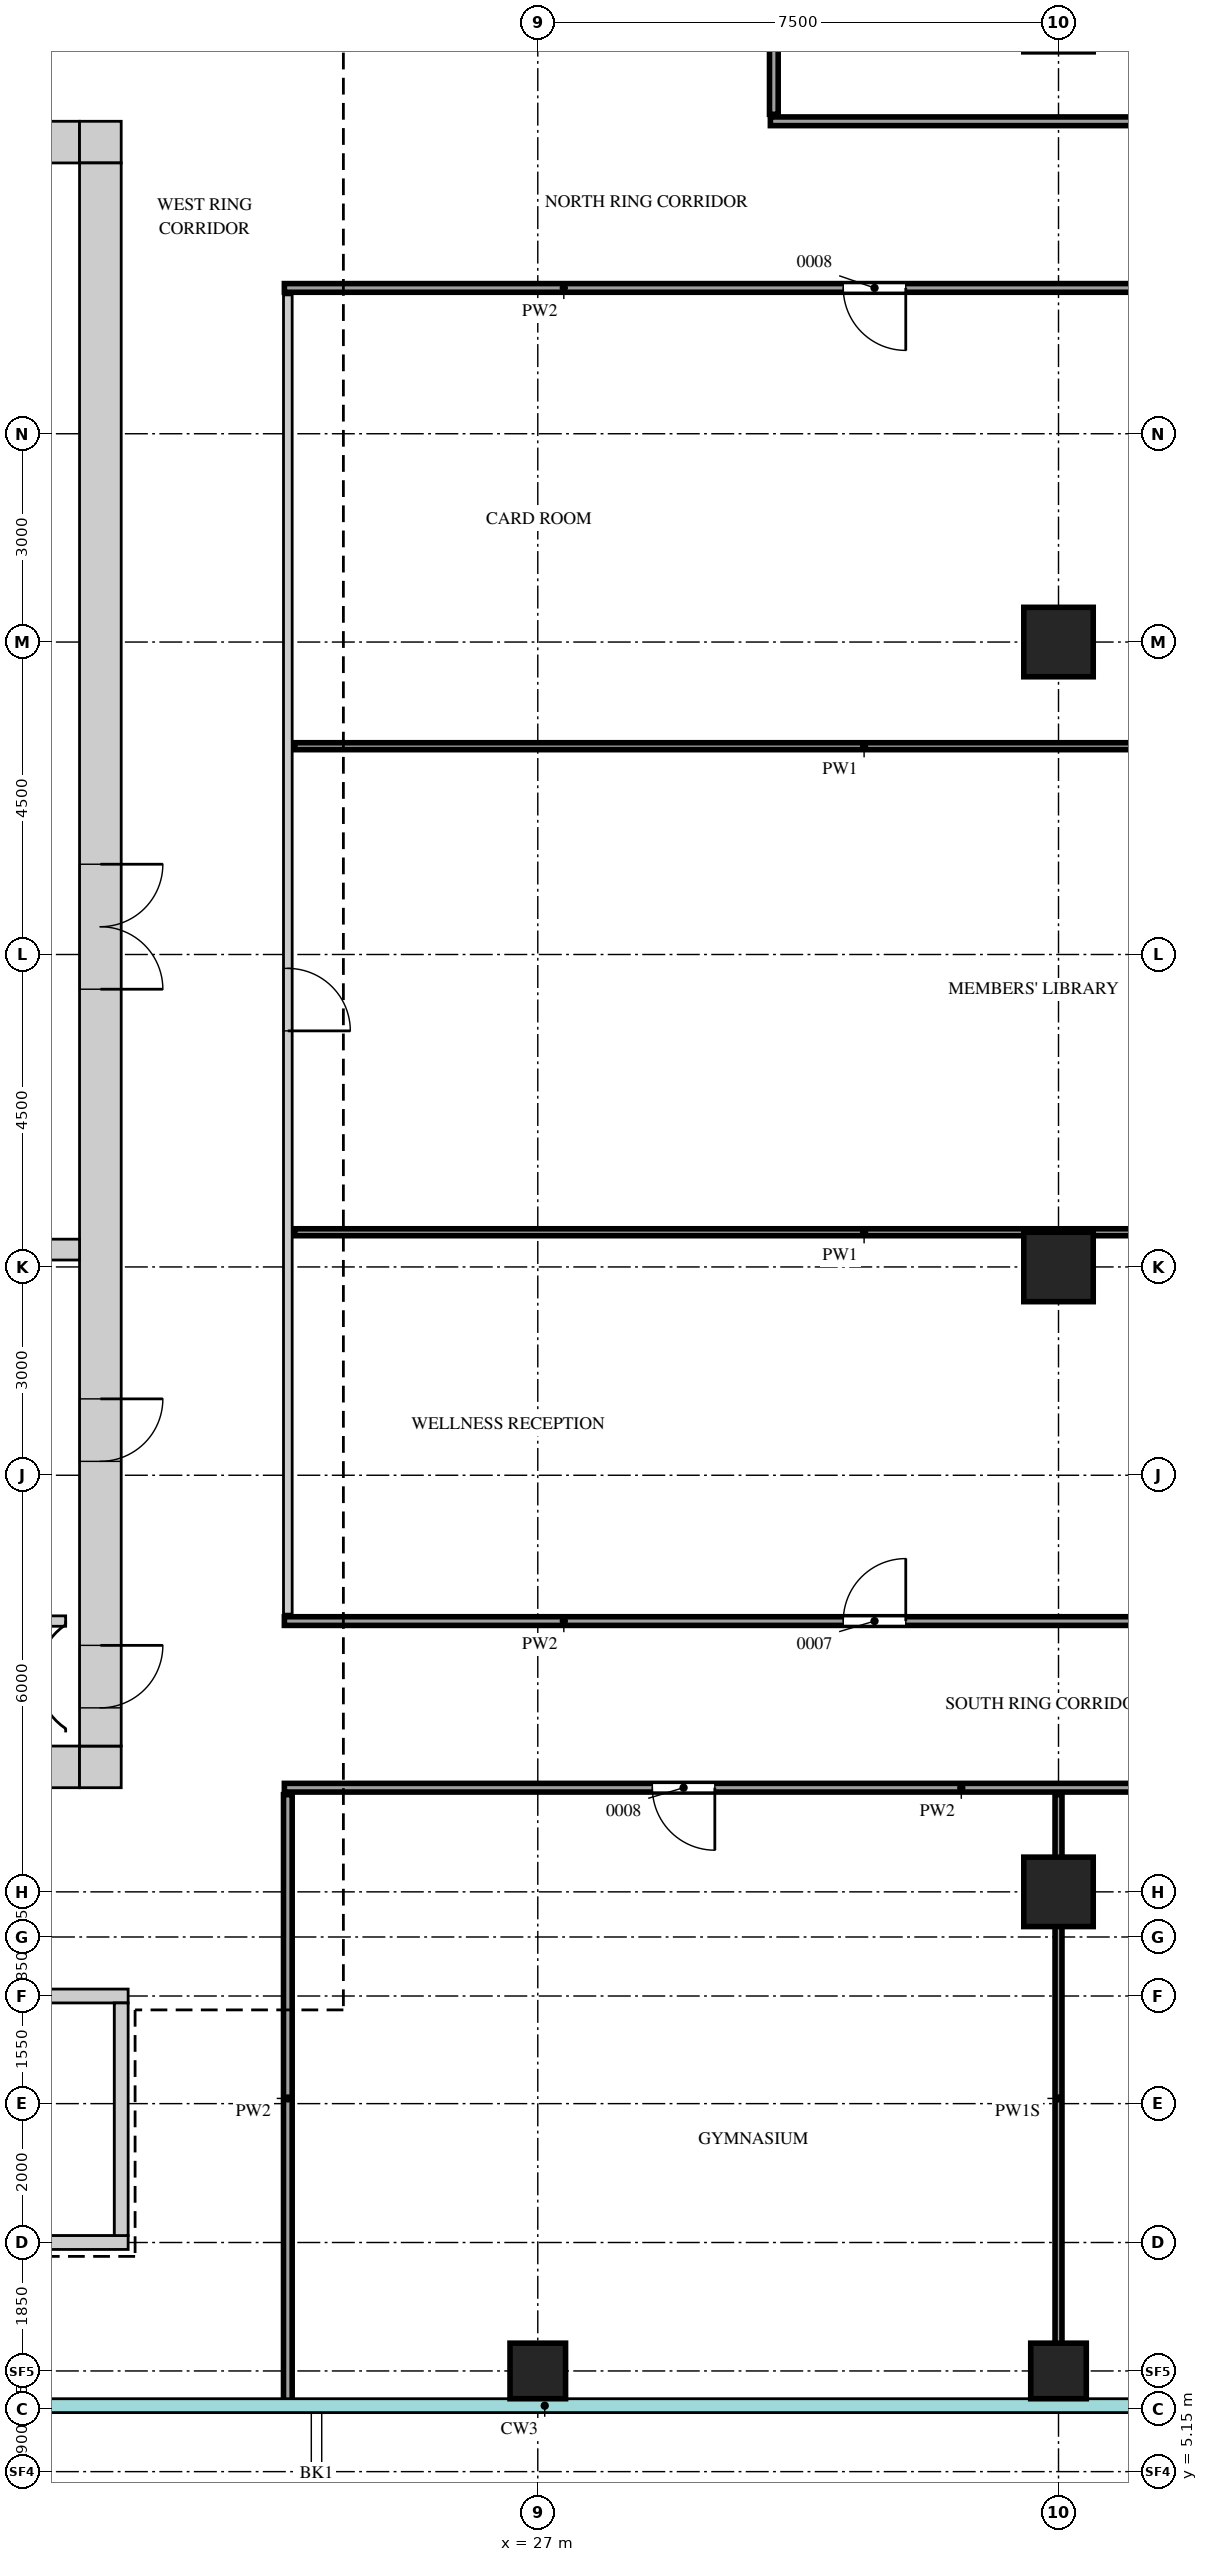
"""IFC4 building model, lengths in metres.
Left out: names, types, materials, properties, quantities, classifications, styles, units other than length and angle.
Written with IfcOpenShell. Run it as: python <this file> out.ifc"""

import sys

from ifc_helpers import new_model, si_unit, direction, frame, frame_2d, origin, origin_2d, place, context, subcontext, project, spatial, rectangle, extrude, source, transform, mapped, element, fill, save


model = new_model("IFC4")
c1 = context("Model", 3, precision=1e-05, world=origin(), true_north=direction((0.0, 1.0)))
c2 = subcontext(c1, "Body", "Model", "MODEL_VIEW")
j1 = project(units=[si_unit("LENGTHUNIT", "METRE"), si_unit("PLANEANGLEUNIT", "RADIAN")], contexts=[c1])
p1 = place(None, origin())
s1 = spatial("IfcSite", under=j1, at=p1, CompositionType="ELEMENT")
p2 = place(p1, origin())
s2 = spatial("IfcBuilding", under=s1, at=p2, CompositionType="ELEMENT")
p3 = place(p2, frame((0.0, 0.0, 298.2)))
s3 = spatial("IfcBuildingStorey", under=s2, at=p3, CompositionType="ELEMENT", Elevation=298.2)
m1 = source(origin(), c2, "Body", "SweptSolid", [
    extrude(rectangle(XDim=14.4, YDim=0.6, at=frame_2d((7.2, 0.0))), origin(), (0.0, 0.0, 1.0), 3.75),
])
p4 = place(p3, frame((6.0, 38.7, 0.0), z_axis=(0.0, 0.0, 1.0), x_axis=(1.0, 0.0, 0.0)))
e1 = element("IfcWall", 1, at=p4, inside=s3, PredefinedType="SHEAR", context=c2, shape_type="MappedRepresentation", body=[
    mapped(m1, transform((0.0, 0.0, 0.0))),
])
m2 = source(origin(), c2, "Body", "SweptSolid", [
    extrude(rectangle(XDim=0.9, YDim=2.1, at=frame_2d((0.45, 1.05))), frame((0.0, 0.31, 0.0), z_axis=(0.0, -1.0, 0.0), x_axis=(1.0, 0.0, 0.0)), (0.0, 0.0, 1.0), 0.62),
])
p5 = place(p4, frame((3.7, 0.0, 0.0)))
e2 = element("IfcOpeningElement", 2, at=p5, cuts=e1, PredefinedType="OPENING", context=c2, shape_type="MappedRepresentation", body=[
    mapped(m2, transform((0.0, 0.0, 0.0))),
])
p6 = place(p4, frame((8.7, 0.0, 0.0)))
e3 = element("IfcOpeningElement", 3, at=p6, cuts=e1, PredefinedType="OPENING", context=c2, shape_type="MappedRepresentation", body=[
    mapped(m2, transform((0.0, 0.0, 0.0))),
])
p7 = place(p4, frame((12.05, 0.0, 0.0)))
e4 = element("IfcOpeningElement", 4, at=p7, cuts=e1, PredefinedType="OPENING", context=c2, shape_type="MappedRepresentation", body=[
    mapped(m2, transform((0.0, 0.0, 0.0))),
])
m3 = source(origin(), c2, "Body", "SweptSolid", [
    extrude(rectangle(XDim=0.6, YDim=0.6, at=frame_2d((0.3, 0.0))), origin(), (0.0, 0.0, 1.0), 3.75),
])
p8 = place(p3, frame((20.4, 38.7, 0.0), z_axis=(0.0, 0.0, 1.0), x_axis=(1.0, 0.0, 0.0)))
e5 = element("IfcWall", 5, at=p8, inside=s3, PredefinedType="SHEAR", context=c2, shape_type="MappedRepresentation", body=[
    mapped(m3, transform((0.0, 0.0, 0.0))),
])
p9 = place(p3, frame((6.0, 15.3, 0.0), z_axis=(0.0, 0.0, 1.0), x_axis=(1.0, 0.0, 0.0)))
e6 = element("IfcWall", 6, at=p9, inside=s3, PredefinedType="SHEAR", context=c2, shape_type="MappedRepresentation", body=[
    mapped(m1, transform((0.0, 0.0, 0.0))),
])
m4 = source(origin(), c2, "Body", "SweptSolid", [
    extrude(rectangle(XDim=1.2, YDim=2.1, at=frame_2d((0.6, 1.05))), frame((0.0, 0.31, 0.0), z_axis=(0.0, -1.0, 0.0), x_axis=(1.0, 0.0, 0.0)), (0.0, 0.0, 1.0), 0.62),
])
p10 = place(p9, frame((6.2, 0.0, 0.0)))
e7 = element("IfcOpeningElement", 7, at=p10, cuts=e6, PredefinedType="OPENING", context=c2, shape_type="MappedRepresentation", body=[
    mapped(m4, transform((0.0, 0.0, 0.0))),
])
p11 = place(p9, frame((2.85, 0.0, 0.0)))
e8 = element("IfcOpeningElement", 8, at=p11, cuts=e6, PredefinedType="OPENING", context=c2, shape_type="MappedRepresentation", body=[
    mapped(m4, transform((0.0, 0.0, 0.0))),
])
m5 = source(origin(), c2, "Body", "SweptSolid", [
    extrude(rectangle(XDim=1.0, YDim=2.1, at=frame_2d((0.5, 1.05))), frame((0.0, 0.31, 0.0), z_axis=(0.0, -1.0, 0.0), x_axis=(1.0, 0.0, 0.0)), (0.0, 0.0, 1.0), 0.62),
])
p12 = place(p9, frame((8.7, 0.0, 0.0)))
e9 = element("IfcOpeningElement", 9, at=p12, cuts=e6, PredefinedType="OPENING", context=c2, shape_type="MappedRepresentation", body=[
    mapped(m5, transform((0.0, 0.0, 0.0))),
])
p13 = place(p3, frame((20.4, 15.3, 0.0), z_axis=(0.0, 0.0, 1.0), x_axis=(1.0, 0.0, 0.0)))
e10 = element("IfcWall", 10, at=p13, inside=s3, PredefinedType="SHEAR", context=c2, shape_type="MappedRepresentation", body=[
    mapped(m3, transform((0.0, 0.0, 0.0))),
])
m6 = source(origin(), c2, "Body", "SweptSolid", [
    extrude(rectangle(XDim=22.8, YDim=0.6, at=frame_2d((11.4, 0.0))), origin(), (0.0, 0.0, 1.0), 3.75),
])
p14 = place(p3, frame((20.7, 15.6, 0.0), z_axis=(0.0, 0.0, 1.0), x_axis=(0.0, 1.0, 0.0)))
e11 = element("IfcWall", 11, at=p14, inside=s3, PredefinedType="SHEAR", context=c2, shape_type="MappedRepresentation", body=[
    mapped(m6, transform((0.0, 0.0, 0.0))),
])
m7 = source(origin(), c2, "Body", "SweptSolid", [
    extrude(rectangle(XDim=1.8, YDim=2.1, at=frame_2d((0.9, 1.05))), frame((0.0, 0.31, 0.0), z_axis=(0.0, -1.0, 0.0), x_axis=(1.0, 0.0, 0.0)), (0.0, 0.0, 1.0), 0.62),
])
p15 = place(p14, frame((10.9, 0.0, 0.0)))
e12 = element("IfcOpeningElement", 12, at=p15, cuts=e11, PredefinedType="OPENING", context=c2, shape_type="MappedRepresentation", body=[
    mapped(m7, transform((0.0, 0.0, 0.0))),
])
p16 = place(p14, frame((0.55, 0.0, 0.0)))
e13 = element("IfcOpeningElement", 13, at=p16, cuts=e11, PredefinedType="OPENING", context=c2, shape_type="MappedRepresentation", body=[
    mapped(m2, transform((0.0, 0.0, 0.0))),
])
p17 = place(p14, frame((4.1, 0.0, 0.0)))
e14 = element("IfcOpeningElement", 14, at=p17, cuts=e11, PredefinedType="OPENING", context=c2, shape_type="MappedRepresentation", body=[
    mapped(m2, transform((0.0, 0.0, 0.0))),
])
m8 = source(origin(), c2, "Body", "SweptSolid", [
    extrude(rectangle(XDim=7.2, YDim=0.2, at=frame_2d((3.6, 0.0))), origin(), (0.0, 0.0, 1.0), 3.75),
])
p18 = place(p3, frame((13.9, 12.0, 0.0), z_axis=(0.0, 0.0, 1.0), x_axis=(1.0, 0.0, 0.0)))
e15 = element("IfcWall", 15, at=p18, inside=s3, PredefinedType="SHEAR", context=c2, shape_type="MappedRepresentation", body=[
    mapped(m8, transform((0.0, 0.0, 0.0))),
])
p19 = place(p3, frame((13.9, 8.45, 0.0), z_axis=(0.0, 0.0, 1.0), x_axis=(1.0, 0.0, 0.0)))
e16 = element("IfcWall", 16, at=p19, inside=s3, PredefinedType="SHEAR", context=c2, shape_type="MappedRepresentation", body=[
    mapped(m8, transform((0.0, 0.0, 0.0))),
])
m9 = source(origin(), c2, "Body", "SweptSolid", [
    extrude(rectangle(XDim=1.2, YDim=2.1, at=frame_2d((0.6, 1.05))), frame((0.0, 0.11, 0.0), z_axis=(0.0, -1.0, 0.0), x_axis=(1.0, 0.0, 0.0)), (0.0, 0.0, 1.0), 0.22),
])
p20 = place(p19, frame((0.35, 0.0, 0.0)))
e17 = element("IfcOpeningElement", 17, at=p20, cuts=e16, PredefinedType="OPENING", context=c2, shape_type="MappedRepresentation", body=[
    mapped(m9, transform((0.0, 0.0, 0.0))),
])
m10 = source(origin(), c2, "Body", "SweptSolid", [
    extrude(rectangle(XDim=3.35, YDim=0.2, at=frame_2d((1.675, 0.0))), origin(), (0.0, 0.0, 1.0), 3.75),
])
p21 = place(p3, frame((21.0, 8.55, 0.0), z_axis=(0.0, 0.0, 1.0), x_axis=(0.0, 1.0, 0.0)))
e18 = element("IfcWall", 18, at=p21, inside=s3, PredefinedType="SHEAR", context=c2, shape_type="MappedRepresentation", body=[
    mapped(m10, transform((0.0, 0.0, 0.0))),
])
m11 = source(origin(), c2, "Body", "SweptSolid", [
    extrude(rectangle(XDim=13.2, YDim=0.3, at=frame_2d((6.6, 0.0))), origin(), (0.0, 0.0, 1.0), 3.75),
])
p22 = place(p3, frame((7.2, 22.75, 0.0), z_axis=(0.0, 0.0, 1.0), x_axis=(1.0, 0.0, 0.0)))
e19 = element("IfcWall", 19, at=p22, inside=s3, PredefinedType="STANDARD", context=c2, shape_type="MappedRepresentation", body=[
    mapped(m11, transform((0.0, 0.0, 0.0))),
])
m12 = source(origin(), c2, "Body", "SweptSolid", [
    extrude(rectangle(XDim=0.8, YDim=0.8, at=origin_2d()), origin(), (0.0, 0.0, 1.0), 3.75),
])
for number, where, z_axis, x_axis in (
    (20, (27.0, 6.6, 0.0), (0.0, 0.0, 1.0), (1.0, 0.0, 0.0)),
    (21, (34.5, 6.6, 0.0), (0.0, 0.0, 1.0), (1.0, 0.0, 0.0)),
):
    element("IfcColumn", number, at=place(p3, frame(where, z_axis=z_axis, x_axis=x_axis)), inside=s3, PredefinedType="COLUMN", context=c2, shape_type="MappedRepresentation", body=[
        mapped(m12, transform((0.0, 0.0, 0.0))),
    ])
m13 = source(origin(), c2, "Body", "SweptSolid", [
    extrude(rectangle(XDim=1.0, YDim=1.0, at=origin_2d()), origin(), (0.0, 0.0, 1.0), 3.75),
])
for number, where, z_axis, x_axis in (
    (22, (34.5, 13.5, 0.0), (0.0, 0.0, 1.0), (1.0, 0.0, 0.0)),
    (23, (34.5, 22.5, 0.0), (0.0, 0.0, 1.0), (1.0, 0.0, 0.0)),
    (24, (34.5, 31.5, 0.0), (0.0, 0.0, 1.0), (1.0, 0.0, 0.0)),
):
    element("IfcColumn", number, at=place(p3, frame(where, z_axis=z_axis, x_axis=x_axis)), inside=s3, PredefinedType="COLUMN", context=c2, shape_type="MappedRepresentation", body=[
        mapped(m13, transform((0.0, 0.0, 0.0))),
    ])
m14 = source(origin(), c2, "Body", "SweptSolid", [
    extrude(rectangle(XDim=8.75, YDim=0.125, at=frame_2d((4.375, 0.0))), origin(), (0.0, 0.0, 1.0), 3.8),
])
p23 = place(p3, frame((23.4, 6.15, 0.0), z_axis=(0.0, 0.0, 1.0), x_axis=(0.0, 1.0, 0.0)))
e25 = element("IfcWall", 25, at=p23, inside=s3, PredefinedType="PARTITIONING", context=c2, shape_type="MappedRepresentation", body=[
    mapped(m14, transform((0.0, 0.0, 0.0))),
])
m15 = source(origin(), c2, "Body", "SweptSolid", [
    extrude(rectangle(XDim=8.75, YDim=0.1, at=frame_2d((4.375, 0.0))), origin(), (0.0, 0.0, 1.0), 3.35),
])
p24 = place(p3, frame((34.5, 6.15, 0.0), z_axis=(0.0, 0.0, 1.0), x_axis=(0.0, 1.0, 0.0)))
e26 = element("IfcWall", 26, at=p24, inside=s3, PredefinedType="PARTITIONING", context=c2, shape_type="MappedRepresentation", body=[
    mapped(m15, transform((0.0, 0.0, 0.0))),
])
m16 = source(origin(), c2, "Body", "SweptSolid", [
    extrude(rectangle(XDim=19.1, YDim=0.125, at=frame_2d((9.55, 0.0))), origin(), (0.0, 0.0, 1.0), 3.8),
])
p25 = place(p3, frame((23.35, 15.0, 0.0), z_axis=(0.0, 0.0, 1.0), x_axis=(1.0, 0.0, 0.0)))
e27 = element("IfcWall", 27, at=p25, inside=s3, PredefinedType="PARTITIONING", context=c2, shape_type="MappedRepresentation", body=[
    mapped(m16, transform((0.0, 0.0, 0.0))),
])
m17 = source(origin(), c2, "Body", "SweptSolid", [
    extrude(rectangle(XDim=0.9, YDim=2.1, at=frame_2d((0.45, 1.05))), frame((0.0, 0.073, 0.0), z_axis=(0.0, -1.0, 0.0), x_axis=(1.0, 0.0, 0.0)), (0.0, 0.0, 1.0), 0.145),
])
p26 = place(p25, frame((5.3, 0.0, 0.0)))
e28 = element("IfcOpeningElement", 28, at=p26, cuts=e27, PredefinedType="OPENING", context=c2, shape_type="MappedRepresentation", body=[
    mapped(m17, transform((0.0, 0.0, 0.0))),
])
p27 = place(p25, frame((13.3, 0.0, 0.0)))
e29 = element("IfcOpeningElement", 29, at=p27, cuts=e27, PredefinedType="OPENING", context=c2, shape_type="MappedRepresentation", body=[
    mapped(m17, transform((0.0, 0.0, 0.0))),
])
p28 = place(p25, frame((17.95, 0.0, 0.0)))
e30 = element("IfcOpeningElement", 30, at=p28, cuts=e27, PredefinedType="OPENING", context=c2, shape_type="MappedRepresentation", body=[
    mapped(m17, transform((0.0, 0.0, 0.0))),
])
m18 = source(origin(), c2, "Body", "SweptSolid", [
    extrude(rectangle(XDim=4.0, YDim=0.15, at=frame_2d((2.0, 0.0))), origin(), (0.0, 0.0, 1.0), 3.8),
])
p29 = place(p3, frame((16.2, 17.4, 0.0), z_axis=(0.0, 0.0, 1.0), x_axis=(1.0, 0.0, 0.0)))
e31 = element("IfcWall", 31, at=p29, inside=s3, PredefinedType="PARTITIONING", context=c2, shape_type="MappedRepresentation", body=[
    mapped(m18, transform((0.0, 0.0, 0.0))),
])
m19 = source(origin(), c2, "Body", "SweptSolid", [
    extrude(rectangle(XDim=16.7, YDim=0.125, at=frame_2d((8.35, 0.0))), origin(), (0.0, 0.0, 1.0), 3.8),
])
p30 = place(p3, frame((23.35, 17.4, 0.0), z_axis=(0.0, 0.0, 1.0), x_axis=(1.0, 0.0, 0.0)))
e32 = element("IfcWall", 32, at=p30, inside=s3, PredefinedType="PARTITIONING", context=c2, shape_type="MappedRepresentation", body=[
    mapped(m19, transform((0.0, 0.0, 0.0))),
])
p31 = place(p30, frame((8.05, 0.0, 0.0)))
e33 = element("IfcOpeningElement", 33, at=p31, cuts=e32, PredefinedType="OPENING", context=c2, shape_type="MappedRepresentation", body=[
    mapped(m17, transform((0.0, 0.0, 0.0))),
])
m20 = source(origin(), c2, "Body", "SweptSolid", [
    extrude(rectangle(XDim=19.0, YDim=0.125, at=frame_2d((9.5, 0.0))), origin(), (0.0, 0.0, 1.0), 3.8),
])
p32 = place(p3, frame((23.4, 17.5, 0.0), z_axis=(0.0, 0.0, 1.0), x_axis=(0.0, 1.0, 0.0)))
e34 = element("IfcWall", 34, at=p32, inside=s3, PredefinedType="PARTITIONING", context=c2, shape_type="MappedRepresentation", body=[
    mapped(m20, transform((0.0, 0.0, 0.0))),
])
p33 = place(p32, frame((8.4, 0.0, 0.0)))
e35 = element("IfcOpeningElement", 35, at=p33, cuts=e34, PredefinedType="OPENING", context=c2, shape_type="MappedRepresentation", body=[
    mapped(m17, transform((0.0, 0.0, 0.0))),
])
m21 = source(origin(), c2, "Body", "SweptSolid", [
    extrude(rectangle(XDim=16.4, YDim=0.1, at=frame_2d((8.2, 0.0))), origin(), (0.0, 0.0, 1.0), 3.8),
])
for number, where, z_axis, x_axis in (
    (36, (23.5, 23.0, 0.0), (0.0, 0.0, 1.0), (1.0, 0.0, 0.0)),
    (37, (23.5, 30.0, 0.0), (0.0, 0.0, 1.0), (1.0, 0.0, 0.0)),
):
    element("IfcWall", number, at=place(p3, frame(where, z_axis=z_axis, x_axis=x_axis)), inside=s3, PredefinedType="PARTITIONING", context=c2, shape_type="MappedRepresentation", body=[
        mapped(m21, transform((0.0, 0.0, 0.0))),
    ])
p34 = place(p3, frame((23.35, 36.6, 0.0), z_axis=(0.0, 0.0, 1.0), x_axis=(1.0, 0.0, 0.0)))
e38 = element("IfcWall", 38, at=p34, inside=s3, PredefinedType="PARTITIONING", context=c2, shape_type="MappedRepresentation", body=[
    mapped(m19, transform((0.0, 0.0, 0.0))),
])
p35 = place(p34, frame((8.05, 0.0, 0.0)))
e39 = element("IfcOpeningElement", 39, at=p35, cuts=e38, PredefinedType="OPENING", context=c2, shape_type="MappedRepresentation", body=[
    mapped(m17, transform((0.0, 0.0, 0.0))),
])
m22 = source(origin(), c2, "Body", "SweptSolid", [
    extrude(rectangle(XDim=12.1, YDim=0.125, at=frame_2d((6.05, 0.0))), origin(), (0.0, 0.0, 1.0), 3.8),
])
p36 = place(p3, frame((30.35, 39.0, 0.0), z_axis=(0.0, 0.0, 1.0), x_axis=(1.0, 0.0, 0.0)))
e40 = element("IfcWall", 40, at=p36, inside=s3, PredefinedType="PARTITIONING", context=c2, shape_type="MappedRepresentation", body=[
    mapped(m22, transform((0.0, 0.0, 0.0))),
])
m23 = source(origin(), c2, "Body", "SweptSolid", [
    extrude(rectangle(XDim=1.2, YDim=2.1, at=frame_2d((0.6, 1.05))), frame((0.0, 0.073, 0.0), z_axis=(0.0, -1.0, 0.0), x_axis=(1.0, 0.0, 0.0)), (0.0, 0.0, 1.0), 0.145),
])
p37 = place(p36, frame((5.25, 0.0, 0.0)))
e41 = element("IfcOpeningElement", 41, at=p37, cuts=e40, PredefinedType="OPENING", context=c2, shape_type="MappedRepresentation", body=[
    mapped(m23, transform((0.0, 0.0, 0.0))),
])
p38 = place(p3, frame((30.4, 39.1, 0.0), z_axis=(0.0, 0.0, 1.0), x_axis=(0.0, 1.0, 0.0)))
e42 = element("IfcWall", 42, at=p38, inside=s3, PredefinedType="PARTITIONING", context=c2, shape_type="MappedRepresentation", body=[
    mapped(m14, transform((0.0, 0.0, 0.0))),
])
m24 = source(origin(), c2, "Body", "SweptSolid", [
    extrude(rectangle(XDim=1.8, YDim=2.1, at=frame_2d((0.9, 1.05))), frame((0.0, 0.25, 0.0), z_axis=(0.0, -1.0, 0.0), x_axis=(1.0, 0.0, 0.0)), (0.0, 0.0, 1.0), 0.5),
])
p39 = place(p15, origin())
e43 = element("IfcDoor", 43, at=p39, inside=s3, OperationType="DOUBLE_DOOR_SINGLE_SWING", PredefinedType="DOOR", context=c2, shape_type="MappedRepresentation", body=[
    mapped(m24, transform((0.0, 0.0, 0.0))),
])
fill(e12, e43)
m25 = source(origin(), c2, "Body", "SweptSolid", [
    extrude(rectangle(XDim=0.9, YDim=2.1, at=frame_2d((0.45, 1.05))), frame((0.0, 0.25, 0.0), z_axis=(0.0, -1.0, 0.0), x_axis=(1.0, 0.0, 0.0)), (0.0, 0.0, 1.0), 0.5),
])
p40 = place(p16, origin())
e44 = element("IfcDoor", 44, at=p40, inside=s3, OperationType="SINGLE_SWING_RIGHT", PredefinedType="DOOR", context=c2, shape_type="MappedRepresentation", body=[
    mapped(m25, transform((0.0, 0.0, 0.0))),
])
fill(e13, e44)
p41 = place(p17, origin())
e45 = element("IfcDoor", 45, at=p41, inside=s3, OperationType="SINGLE_SWING_RIGHT", PredefinedType="DOOR", context=c2, shape_type="MappedRepresentation", body=[
    mapped(m25, transform((0.0, 0.0, 0.0))),
])
fill(e14, e45)
m26 = source(origin(), c2, "Body", "SweptSolid", [
    extrude(rectangle(XDim=0.9, YDim=2.1, at=frame_2d((0.45, 1.05))), frame((0.0, 0.025, 0.0), z_axis=(0.0, -1.0, 0.0), x_axis=(1.0, 0.0, 0.0)), (0.0, 0.0, 1.0), 0.05),
])
p42 = place(p26, origin())
e46 = element("IfcDoor", 46, at=p42, inside=s3, OperationType="SINGLE_SWING_RIGHT", PredefinedType="DOOR", context=c2, shape_type="MappedRepresentation", body=[
    mapped(m26, transform((0.0, 0.0, 0.0))),
])
fill(e28, e46)
p43 = place(p31, origin())
e47 = element("IfcDoor", 47, at=p43, inside=s3, OperationType="SINGLE_SWING_LEFT", PredefinedType="DOOR", context=c2, shape_type="MappedRepresentation", body=[
    mapped(m26, transform((0.0, 0.0, 0.0))),
])
fill(e33, e47)
p44 = place(p33, origin())
e48 = element("IfcDoor", 48, at=p44, inside=s3, OperationType="SINGLE_SWING_LEFT", PredefinedType="DOOR", context=c2, shape_type="MappedRepresentation", body=[
    mapped(m26, transform((0.0, 0.0, 0.0))),
])
fill(e35, e48)
p45 = place(p35, origin())
e49 = element("IfcDoor", 49, at=p45, inside=s3, OperationType="SINGLE_SWING_RIGHT", PredefinedType="DOOR", context=c2, shape_type="MappedRepresentation", body=[
    mapped(m26, transform((0.0, 0.0, 0.0))),
])
fill(e39, e49)
save(model, sys.argv[1])
